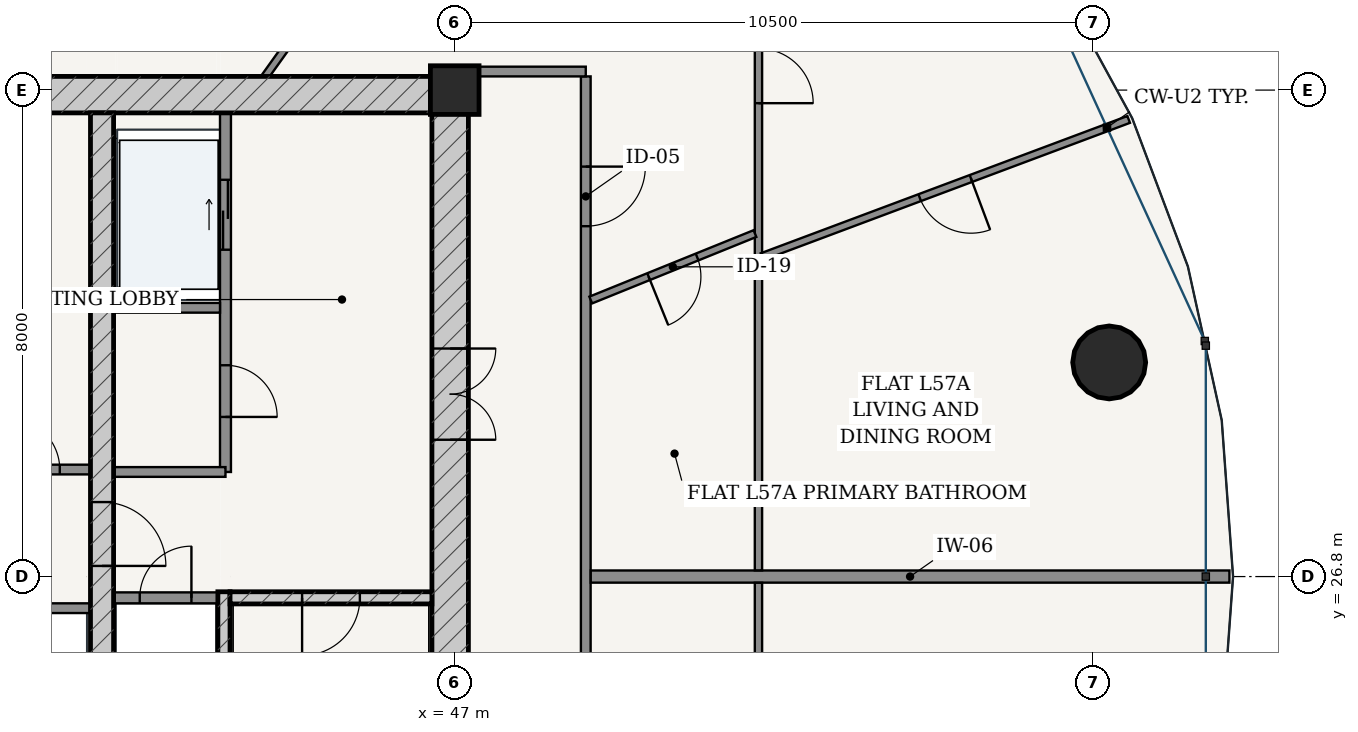
"""IFC4 building model, lengths in metres.
Left out: names, types, materials, properties, quantities, classifications, styles, units other than length and angle.
Written with IfcOpenShell. Run it as: python <this file> out.ifc"""

import sys

from ifc_helpers import new_model, si_unit, direction, frame, frame_2d, origin, origin_2d, place, context, subcontext, project, spatial, rectangle, hollow_circle, extrude, source, transform, mapped, element, fill, save


model = new_model("IFC4")
c1 = context("Model", 3, precision=1e-05, world=origin(), true_north=direction((-0.2419218956, 0.970295726276)))
c2 = subcontext(c1, "Body", "Model", "MODEL_VIEW")
j1 = project(units=[si_unit("LENGTHUNIT", "METRE"), si_unit("PLANEANGLEUNIT", "RADIAN")], contexts=[c1])
p1 = place(None, origin())
s1 = spatial("IfcSite", under=j1, at=p1, CompositionType="ELEMENT")
p2 = place(p1, origin())
s2 = spatial("IfcBuilding", under=s1, at=p2, CompositionType="ELEMENT")
p3 = place(p2, frame((0.0, 0.0, 217.1)))
s3 = spatial("IfcBuildingStorey", under=s2, at=p3, CompositionType="ELEMENT", Elevation=217.1)
p4 = place(p3, frame((47.0, 34.8, 0.0), z_axis=(0.0, 0.0, 1.0), x_axis=(1.0, 0.0, 0.0)))
e1 = element("IfcColumn", 1, at=p4, inside=s3, PredefinedType="COLUMN", context=c2, shape_type="SweptSolid", body=[
    extrude(rectangle(XDim=0.8, YDim=0.8, at=origin_2d()), origin(), (0.0, 0.0, 1.0), 3.7),
])
p5 = place(p3, frame((28.775, 34.725, 0.0), z_axis=(0.0, 0.0, 1.0), x_axis=(1.0, 0.0, 0.0)))
e2 = element("IfcWall", 2, at=p5, inside=s3, PredefinedType="SHEAR", context=c2, shape_type="SweptSolid", body=[
    extrude(rectangle(XDim=18.45, YDim=0.6, at=frame_2d((9.225, 0.0))), origin(), (0.0, 0.0, 1.0), 3.435),
])
p6 = place(p3, frame((46.925, 19.175, 0.0), z_axis=(0.0, 0.0, 1.0), x_axis=(0.0, 1.0, 0.0)))
e3 = element("IfcWall", 3, at=p6, inside=s3, PredefinedType="SHEAR", context=c2, shape_type="SweptSolid", body=[
    extrude(rectangle(XDim=15.25, YDim=0.6, at=frame_2d((7.625, 0.0))), origin(), (0.0, 0.0, 1.0), 3.435),
])
p7 = place(p6, frame((9.875, 0.0, 0.0)))
e4 = element("IfcOpeningElement", 4, at=p7, cuts=e3, PredefinedType="OPENING", context=c2, shape_type="SweptSolid", body=[
    extrude(rectangle(XDim=1.5, YDim=2.2, at=frame_2d((0.75, 1.1))), frame((0.0, 0.31, 0.0), z_axis=(0.0, -1.0, 0.0), x_axis=(1.0, 0.0, 0.0)), (0.0, 0.0, 1.0), 0.62),
])
p8 = place(p3, frame((43.205, 19.175, 0.0), z_axis=(0.0, 0.0, 1.0), x_axis=(0.0, 1.0, 0.0)))
e5 = element("IfcWall", 5, at=p8, inside=s3, PredefinedType="SOLIDWALL", context=c2, shape_type="SweptSolid", body=[
    extrude(rectangle(XDim=7.375, YDim=0.2, at=frame_2d((3.688, 0.0))), origin(), (0.0, 0.0, 1.0), 3.435),
])
p9 = place(p3, frame((43.305, 26.45, 0.0), z_axis=(0.0, 0.0, 1.0), x_axis=(1.0, 0.0, 0.0)))
e6 = element("IfcWall", 6, at=p9, inside=s3, PredefinedType="SOLIDWALL", context=c2, shape_type="SweptSolid", body=[
    extrude(rectangle(XDim=3.32, YDim=0.2, at=frame_2d((1.66, 0.0))), origin(), (0.0, 0.0, 1.0), 3.435),
])
p10 = place(p9, frame((1.185, 0.0, 0.0)))
e7 = element("IfcOpeningElement", 7, at=p10, cuts=e6, PredefinedType="OPENING", context=c2, shape_type="SweptSolid", body=[
    extrude(rectangle(XDim=0.95, YDim=2.15, at=frame_2d((0.475, 1.075))), frame((0.0, 0.11, 0.0), z_axis=(0.0, -1.0, 0.0), x_axis=(1.0, 0.0, 0.0)), (0.0, 0.0, 1.0), 0.22),
])
p11 = place(p3, frame((41.2, 19.175, 0.0), z_axis=(0.0, 0.0, 1.0), x_axis=(0.0, 1.0, 0.0)))
e8 = element("IfcWall", 8, at=p11, inside=s3, PredefinedType="SHEAR", context=c2, shape_type="SweptSolid", body=[
    extrude(rectangle(XDim=15.25, YDim=0.38, at=frame_2d((7.625, 0.0))), origin(), (0.0, 0.0, 1.0), 3.435),
])
p12 = place(p11, frame((7.8, 0.0, 0.0)))
e9 = element("IfcOpeningElement", 9, at=p12, cuts=e8, PredefinedType="OPENING", context=c2, shape_type="SweptSolid", body=[
    extrude(rectangle(XDim=1.05, YDim=2.15, at=frame_2d((0.525, 1.075))), frame((0.0, 0.2, 0.0), z_axis=(0.0, -1.0, 0.0), x_axis=(1.0, 0.0, 0.0)), (0.0, 0.0, 1.0), 0.4),
])
p13 = place(p3, frame((57.763, 30.321, 0.0), z_axis=(0.0, 0.0, 1.0), x_axis=(1.0, 0.0, 0.0)))
e10 = element("IfcColumn", 10, at=p13, inside=s3, PredefinedType="COLUMN", context=c2, shape_type="SweptSolid", body=[
    extrude(hollow_circle(Radius=0.6, WallThickness=0.038, at=origin_2d()), origin(), (0.0, 0.0, 1.0), 3.7),
])
p14 = place(p3, frame((41.39, 26.45, 0.0), z_axis=(0.0, 0.0, 1.0), x_axis=(1.0, 0.0, 0.0)))
e11 = element("IfcWall", 11, at=p14, inside=s3, PredefinedType="PARTITIONING", context=c2, shape_type="SweptSolid", body=[
    extrude(rectangle(XDim=1.71, YDim=0.18, at=frame_2d((0.855, 0.0))), origin(), (0.0, 0.0, 1.0), 3.435),
])
p15 = place(p14, frame((0.43, 0.0, 0.0)))
e12 = element("IfcOpeningElement", 12, at=p15, cuts=e11, PredefinedType="OPENING", context=c2, shape_type="SweptSolid", body=[
    extrude(rectangle(XDim=0.85, YDim=2.1, at=frame_2d((0.425, 1.05))), frame((0.0, 0.1, 0.0), z_axis=(0.0, -1.0, 0.0), x_axis=(1.0, 0.0, 0.0)), (0.0, 0.0, 1.0), 0.2),
])
p16 = place(p3, frame((43.23, 28.52, 0.0), z_axis=(0.0, 0.0, 1.0), x_axis=(0.0, 1.0, 0.0)))
e13 = element("IfcWall", 13, at=p16, inside=s3, PredefinedType="PARTITIONING", context=c2, shape_type="SweptSolid", body=[
    extrude(rectangle(XDim=5.905, YDim=0.18, at=frame_2d((2.953, 0.0))), origin(), (0.0, 0.0, 1.0), 3.435),
])
p17 = place(p16, frame((0.905, 0.0, 0.0)))
e14 = element("IfcOpeningElement", 14, at=p17, cuts=e13, PredefinedType="OPENING", context=c2, shape_type="SweptSolid", body=[
    extrude(rectangle(XDim=0.85, YDim=2.1, at=frame_2d((0.425, 1.05))), frame((0.0, 0.1, 0.0), z_axis=(0.0, -1.0, 0.0), x_axis=(1.0, 0.0, 0.0)), (0.0, 0.0, 1.0), 0.2),
])
p18 = place(p16, frame((3.655, 0.0, 0.0)))
e15 = element("IfcOpeningElement", 15, at=p18, cuts=e13, PredefinedType="OPENING", context=c2, shape_type="SweptSolid", body=[
    extrude(rectangle(XDim=1.15, YDim=2.2, at=frame_2d((0.575, 1.1))), frame((0.0, 0.1, 0.0), z_axis=(0.0, -1.0, 0.0), x_axis=(1.0, 0.0, 0.0)), (0.0, 0.0, 1.0), 0.2),
])
p19 = place(p3, frame((41.39, 31.22, 0.0), z_axis=(0.0, 0.0, 1.0), x_axis=(1.0, 0.0, 0.0)))
e16 = element("IfcWall", 16, at=p19, inside=s3, PredefinedType="PARTITIONING", context=c2, shape_type="SweptSolid", body=[
    extrude(rectangle(XDim=1.75, YDim=0.16, at=frame_2d((0.875, 0.0))), origin(), (0.0, 0.0, 1.0), 3.435),
])
p20 = place(p3, frame((41.39, 28.52, 0.0), z_axis=(0.0, 0.0, 1.0), x_axis=(1.0, 0.0, 0.0)))
e17 = element("IfcWall", 17, at=p20, inside=s3, PredefinedType="PARTITIONING", context=c2, shape_type="SweptSolid", body=[
    extrude(rectangle(XDim=1.84, YDim=0.16, at=frame_2d((0.92, 0.0))), origin(), (0.0, 0.0, 1.0), 3.435),
])
p21 = place(p3, frame((34.99, 28.56, 0.0), z_axis=(0.0, 0.0, 1.0), x_axis=(1.0, 0.0, 0.0)))
e18 = element("IfcWall", 18, at=p21, inside=s3, PredefinedType="PARTITIONING", context=c2, shape_type="SweptSolid", body=[
    extrude(rectangle(XDim=6.02, YDim=0.16, at=frame_2d((3.01, 0.0))), origin(), (0.0, 0.0, 1.0), 3.435),
])
p22 = place(p21, frame((0.505, 0.0, 0.0)))
e19 = element("IfcOpeningElement", 19, at=p22, cuts=e18, PredefinedType="OPENING", context=c2, shape_type="SweptSolid", body=[
    extrude(rectangle(XDim=0.85, YDim=2.1, at=frame_2d((0.425, 1.05))), frame((0.0, 0.09, 0.0), z_axis=(0.0, -1.0, 0.0), x_axis=(1.0, 0.0, 0.0)), (0.0, 0.0, 1.0), 0.18),
])
p23 = place(p21, frame((2.58, 0.0, 0.0)))
e20 = element("IfcOpeningElement", 20, at=p23, cuts=e18, PredefinedType="OPENING", context=c2, shape_type="SweptSolid", body=[
    extrude(rectangle(XDim=0.86, YDim=2.1, at=frame_2d((0.43, 1.05))), frame((0.0, 0.09, 0.0), z_axis=(0.0, -1.0, 0.0), x_axis=(1.0, 0.0, 0.0)), (0.0, 0.0, 1.0), 0.18),
])
p24 = place(p21, frame((4.665, 0.0, 0.0)))
e21 = element("IfcOpeningElement", 21, at=p24, cuts=e18, PredefinedType="OPENING", context=c2, shape_type="SweptSolid", body=[
    extrude(rectangle(XDim=0.85, YDim=2.1, at=frame_2d((0.425, 1.05))), frame((0.0, 0.09, 0.0), z_axis=(0.0, -1.0, 0.0), x_axis=(1.0, 0.0, 0.0)), (0.0, 0.0, 1.0), 0.18),
])
p25 = place(p3, frame((34.99, 26.28, 0.0), z_axis=(0.0, 0.0, 1.0), x_axis=(1.0, 0.0, 0.0)))
e22 = element("IfcWall", 22, at=p25, inside=s3, PredefinedType="PARTITIONING", context=c2, shape_type="SweptSolid", body=[
    extrude(rectangle(XDim=6.02, YDim=0.16, at=frame_2d((3.01, 0.0))), origin(), (0.0, 0.0, 1.0), 3.435),
])
p26 = place(p25, frame((0.225, 0.0, 0.0)))
e23 = element("IfcOpeningElement", 23, at=p26, cuts=e22, PredefinedType="OPENING", context=c2, shape_type="SweptSolid", body=[
    extrude(rectangle(XDim=1.1, YDim=2.2, at=frame_2d((0.55, 1.1))), frame((0.0, 0.09, 0.0), z_axis=(0.0, -1.0, 0.0), x_axis=(1.0, 0.0, 0.0)), (0.0, 0.0, 1.0), 0.18),
])
p27 = place(p25, frame((1.705, 0.0, 0.0)))
e24 = element("IfcOpeningElement", 24, at=p27, cuts=e22, PredefinedType="OPENING", context=c2, shape_type="SweptSolid", body=[
    extrude(rectangle(XDim=1.1, YDim=2.2, at=frame_2d((0.55, 1.1))), frame((0.0, 0.09, 0.0), z_axis=(0.0, -1.0, 0.0), x_axis=(1.0, 0.0, 0.0)), (0.0, 0.0, 1.0), 0.18),
])
p28 = place(p3, frame((49.155, 16.725, 0.0), z_axis=(0.0, 0.0, 1.0), x_axis=(0.0, 1.0, 0.0)))
e25 = element("IfcWall", 25, at=p28, inside=s3, PredefinedType="PARTITIONING", context=c2, shape_type="SweptSolid", body=[
    extrude(rectangle(XDim=18.3, YDim=0.16, at=frame_2d((9.15, 0.0))), origin(), (0.0, 0.0, 1.0), 2.951),
])
p29 = place(p28, frame((15.837, 0.0, 0.0)))
e26 = element("IfcOpeningElement", 26, at=p29, cuts=e25, PredefinedType="OPENING", context=c2, shape_type="SweptSolid", body=[
    extrude(rectangle(XDim=0.98, YDim=2.2, at=frame_2d((0.49, 1.1))), frame((0.0, 0.09, 0.0), z_axis=(0.0, -1.0, 0.0), x_axis=(1.0, 0.0, 0.0)), (0.0, 0.0, 1.0), 0.18),
])
p30 = place(p3, frame((47.225, 35.105, 0.0), z_axis=(0.0, 0.0, 1.0), x_axis=(1.0, 0.0, 0.0)))
e27 = element("IfcWall", 27, at=p30, inside=s3, PredefinedType="PARTITIONING", context=c2, shape_type="SweptSolid", body=[
    extrude(rectangle(XDim=1.93, YDim=0.16, at=frame_2d((0.965, 0.0))), origin(), (0.0, 0.0, 1.0), 3.435),
])
p31 = place(p3, frame((49.237, 26.8, 0.0), z_axis=(0.0, 0.0, 1.0), x_axis=(1.0, 0.0, 0.0)))
e28 = element("IfcWall", 28, at=p31, inside=s3, PredefinedType="PARTITIONING", context=c2, shape_type="SweptSolid", body=[
    extrude(rectangle(XDim=10.503, YDim=0.2, at=frame_2d((5.251, 0.0))), origin(), (0.0, 0.0, 1.0), 2.951),
])
p32 = place(p3, frame((51.995, 37.945, 0.0), z_axis=(0.0, 0.0, 1.0), x_axis=(0.0, -1.0, 0.0)))
e29 = element("IfcWall", 29, at=p32, inside=s3, PredefinedType="PARTITIONING", context=c2, shape_type="SweptSolid", body=[
    extrude(rectangle(XDim=11.043, YDim=0.12, at=frame_2d((5.521, 0.0))), origin(), (0.0, 0.0, 1.0), 2.951),
])
p33 = place(p32, frame((2.46, 0.0, 0.0)))
e30 = element("IfcOpeningElement", 30, at=p33, cuts=e29, PredefinedType="OPENING", context=c2, shape_type="SweptSolid", body=[
    extrude(rectangle(XDim=0.9, YDim=2.15, at=frame_2d((0.45, 1.075))), frame((0.0, 0.07, 0.0), z_axis=(0.0, -1.0, 0.0), x_axis=(1.0, 0.0, 0.0)), (0.0, 0.0, 1.0), 0.14),
])
p34 = place(p3, frame((52.053, 32.06, 0.0), z_axis=(0.0, 0.0, 1.0), x_axis=(0.936547148815, 0.350541635255, 0.0)))
e31 = element("IfcWall", 31, at=p34, inside=s3, PredefinedType="PARTITIONING", context=c2, shape_type="SweptSolid", body=[
    extrude(rectangle(XDim=6.439, YDim=0.12, at=frame_2d((3.219, 0.0))), origin(), (0.0, 0.0, 1.0), 2.951),
])
p35 = place(p34, frame((2.769, 0.0, 0.0)))
e32 = element("IfcOpeningElement", 32, at=p35, cuts=e31, PredefinedType="OPENING", context=c2, shape_type="SweptSolid", body=[
    extrude(rectangle(XDim=0.9, YDim=2.15, at=frame_2d((0.45, 1.075))), frame((0.0, 0.07, 0.0), z_axis=(0.0, -1.0, 0.0), x_axis=(1.0, 0.0, 0.0)), (0.0, 0.0, 1.0), 0.14),
])
p36 = place(p3, frame((49.237, 31.347, 0.0), z_axis=(0.0, 0.0, 1.0), x_axis=(0.926960690293, 0.375158471383, 0.0)))
e33 = element("IfcWall", 33, at=p36, inside=s3, PredefinedType="PARTITIONING", context=c2, shape_type="SweptSolid", body=[
    extrude(rectangle(XDim=2.914, YDim=0.12, at=frame_2d((1.457, 0.0))), origin(), (0.0, 0.0, 1.0), 3.11),
])
p37 = place(p36, frame((1.027, 0.0, 0.0)))
e34 = element("IfcOpeningElement", 34, at=p37, cuts=e33, PredefinedType="OPENING", context=c2, shape_type="SweptSolid", body=[
    extrude(rectangle(XDim=0.86, YDim=2.15, at=frame_2d((0.43, 1.075))), frame((0.0, 0.07, 0.0), z_axis=(0.0, -1.0, 0.0), x_axis=(1.0, 0.0, 0.0)), (0.0, 0.0, 1.0), 0.14),
])
p38 = place(p3, frame((43.885, 35.027, 0.0), z_axis=(0.0, 0.0, 1.0), x_axis=(0.581801309538, 0.813330951225, 0.0)))
e35 = element("IfcWall", 35, at=p38, inside=s3, PredefinedType="PARTITIONING", context=c2, shape_type="SweptSolid", body=[
    extrude(rectangle(XDim=3.526, YDim=0.12, at=frame_2d((1.763, 0.0))), origin(), (0.0, 0.0, 1.0), 3.435),
])
p39 = place(p38, frame((1.313, 0.0, 0.0)))
e36 = element("IfcOpeningElement", 36, at=p39, cuts=e35, PredefinedType="OPENING", context=c2, shape_type="SweptSolid", body=[
    extrude(rectangle(XDim=0.9, YDim=2.15, at=frame_2d((0.45, 1.075))), frame((0.0, 0.07, 0.0), z_axis=(0.0, -1.0, 0.0), x_axis=(1.0, 0.0, 0.0)), (0.0, 0.0, 1.0), 0.14),
])
p40 = place(p3, frame((39.811, 35.027, 0.0), z_axis=(0.0, 0.0, 1.0), x_axis=(0.214966857327, 0.976621344356, 0.0)))
e37 = element("IfcWall", 37, at=p40, inside=s3, PredefinedType="PARTITIONING", context=c2, shape_type="SweptSolid", body=[
    extrude(rectangle(XDim=11.258, YDim=0.2, at=frame_2d((5.629, 0.0))), origin(), (0.0, 0.0, 1.0), 2.52),
])
p41 = place(p3, frame((51.995, 26.698, 0.0), z_axis=(0.0, 0.0, 1.0), x_axis=(0.0, -1.0, 0.0)))
e38 = element("IfcWall", 38, at=p41, inside=s3, PredefinedType="PARTITIONING", context=c2, shape_type="SweptSolid", body=[
    extrude(rectangle(XDim=12.893, YDim=0.12, at=frame_2d((6.447, 0.0))), origin(), (0.0, 0.0, 1.0), 2.951),
])
p42 = place(p41, frame((10.051, 0.0, 0.0)))
e39 = element("IfcOpeningElement", 39, at=p42, cuts=e38, PredefinedType="OPENING", context=c2, shape_type="SweptSolid", body=[
    extrude(rectangle(XDim=0.9, YDim=2.15, at=frame_2d((0.45, 1.075))), frame((0.0, 0.07, 0.0), z_axis=(0.0, -1.0, 0.0), x_axis=(1.0, 0.0, 0.0)), (0.0, 0.0, 1.0), 0.14),
])
p43 = place(p41, frame((5.873, 0.0, 0.0)))
e40 = element("IfcOpeningElement", 40, at=p43, cuts=e38, PredefinedType="OPENING", context=c2, shape_type="SweptSolid", body=[
    extrude(rectangle(XDim=0.9, YDim=2.15, at=frame_2d((0.45, 1.075))), frame((0.0, 0.07, 0.0), z_axis=(0.0, -1.0, 0.0), x_axis=(1.0, 0.0, 0.0)), (0.0, 0.0, 1.0), 0.14),
])
m1 = source(origin(), c2, "Body", "SweptSolid", [
    extrude(rectangle(XDim=1.5, YDim=2.2, at=frame_2d((0.75, 1.1))), frame((0.0, 0.025, 0.0), z_axis=(0.0, -1.0, 0.0), x_axis=(1.0, 0.0, 0.0)), (0.0, 0.0, 1.0), 0.05),
])
p44 = place(p7, frame((1.5, 0.0, 0.0), z_axis=(0.0, 0.0, 1.0), x_axis=(-1.0, 0.0, 0.0)))
e41 = element("IfcDoor", 41, at=p44, inside=s3, OperationType="DOUBLE_DOOR_SINGLE_SWING", PredefinedType="DOOR", context=c2, shape_type="MappedRepresentation", body=[
    mapped(m1, transform((0.0, 0.0, 0.0), scale=1.0)),
])
fill(e4, e41)
m2 = source(origin(), c2, "Body", "SweptSolid", [
    extrude(rectangle(XDim=1.05, YDim=2.15, at=frame_2d((0.525, 1.075))), frame((0.0, 0.025, 0.0), z_axis=(0.0, -1.0, 0.0), x_axis=(1.0, 0.0, 0.0)), (0.0, 0.0, 1.0), 0.05),
])
p45 = place(p12, frame((1.05, 0.0, 0.0), z_axis=(0.0, 0.0, 1.0), x_axis=(-1.0, 0.0, 0.0)))
e42 = element("IfcDoor", 42, at=p45, inside=s3, OperationType="SINGLE_SWING_RIGHT", PredefinedType="DOOR", context=c2, shape_type="MappedRepresentation", body=[
    mapped(m2, transform((0.0, 0.0, 0.0), scale=1.0)),
])
fill(e9, e42)
m3 = source(origin(), c2, "Body", "SweptSolid", [
    extrude(rectangle(XDim=0.95, YDim=2.15, at=frame_2d((0.475, 1.075))), frame((0.0, 0.025, 0.0), z_axis=(0.0, -1.0, 0.0), x_axis=(1.0, 0.0, 0.0)), (0.0, 0.0, 1.0), 0.05),
])
p46 = place(p10, frame((0.95, 0.0, 0.0), z_axis=(0.0, 0.0, 1.0), x_axis=(-1.0, 0.0, 0.0)))
e43 = element("IfcDoor", 43, at=p46, inside=s3, OperationType="SINGLE_SWING_RIGHT", PredefinedType="DOOR", context=c2, shape_type="MappedRepresentation", body=[
    mapped(m3, transform((0.0, 0.0, 0.0), scale=1.0)),
])
fill(e7, e43)
m4 = source(origin(), c2, "Body", "SweptSolid", [
    extrude(rectangle(XDim=0.85, YDim=2.1, at=frame_2d((0.425, 1.05))), frame((0.0, 0.025, 0.0), z_axis=(0.0, -1.0, 0.0), x_axis=(1.0, 0.0, 0.0)), (0.0, 0.0, 1.0), 0.05),
])
p47 = place(p15, origin())
e44 = element("IfcDoor", 44, at=p47, inside=s3, OperationType="SINGLE_SWING_RIGHT", PredefinedType="DOOR", context=c2, shape_type="MappedRepresentation", body=[
    mapped(m4, transform((0.0, 0.0, 0.0), scale=1.0)),
])
fill(e12, e44)
p48 = place(p17, frame((0.85, 0.0, 0.0), z_axis=(0.0, 0.0, 1.0), x_axis=(-1.0, 0.0, 0.0)))
e45 = element("IfcDoor", 45, at=p48, inside=s3, OperationType="SINGLE_SWING_RIGHT", PredefinedType="DOOR", context=c2, shape_type="MappedRepresentation", body=[
    mapped(m4, transform((0.0, 0.0, 0.0), scale=1.0)),
])
fill(e14, e45)
p49 = place(p24, origin())
e46 = element("IfcDoor", 46, at=p49, inside=s3, OperationType="SINGLE_SWING_LEFT", PredefinedType="DOOR", context=c2, shape_type="MappedRepresentation", body=[
    mapped(m4, transform((0.0, 0.0, 0.0), scale=1.0)),
])
fill(e21, e46)
m5 = source(origin(), c2, "Body", "SweptSolid", [
    extrude(rectangle(XDim=1.15, YDim=2.2, at=frame_2d((0.575, 1.1))), frame((0.0, 0.025, 0.0), z_axis=(0.0, -1.0, 0.0), x_axis=(1.0, 0.0, 0.0)), (0.0, 0.0, 1.0), 0.05),
])
p50 = place(p18, origin())
e47 = element("IfcDoor", 47, at=p50, inside=s3, OperationType="DOUBLE_DOOR_SLIDING", PredefinedType="DOOR", context=c2, shape_type="MappedRepresentation", body=[
    mapped(m5, transform((0.0, 0.0, 0.0), scale=1.0)),
])
fill(e15, e47)
m6 = source(origin(), c2, "Body", "SweptSolid", [
    extrude(rectangle(XDim=0.98, YDim=2.2, at=frame_2d((0.49, 1.1))), frame((0.0, 0.025, 0.0), z_axis=(0.0, -1.0, 0.0), x_axis=(1.0, 0.0, 0.0)), (0.0, 0.0, 1.0), 0.05),
])
p51 = place(p29, frame((0.98, 0.0, 0.0), z_axis=(0.0, 0.0, 1.0), x_axis=(-1.0, 0.0, 0.0)))
e48 = element("IfcDoor", 48, at=p51, inside=s3, OperationType="SINGLE_SWING_LEFT", PredefinedType="DOOR", context=c2, shape_type="MappedRepresentation", body=[
    mapped(m6, transform((0.0, 0.0, 0.0), scale=1.0)),
])
fill(e26, e48)
m7 = source(origin(), c2, "Body", "SweptSolid", [
    extrude(rectangle(XDim=0.86, YDim=2.15, at=frame_2d((0.43, 1.075))), frame((0.0, 0.025, 0.0), z_axis=(0.0, -1.0, 0.0), x_axis=(1.0, 0.0, 0.0)), (0.0, 0.0, 1.0), 0.05),
])
p52 = place(p37, frame((0.86, 0.0, 0.0), z_axis=(0.0, 0.0, 1.0), x_axis=(-1.0, 0.0, 0.0)))
e49 = element("IfcDoor", 49, at=p52, inside=s3, OperationType="SINGLE_SWING_RIGHT", PredefinedType="DOOR", context=c2, shape_type="MappedRepresentation", body=[
    mapped(m7, transform((0.0, 0.0, 0.0), scale=1.0)),
])
fill(e34, e49)
m8 = source(origin(), c2, "Body", "SweptSolid", [
    extrude(rectangle(XDim=0.9, YDim=2.15, at=frame_2d((0.45, 1.075))), frame((0.0, 0.025, 0.0), z_axis=(0.0, -1.0, 0.0), x_axis=(1.0, 0.0, 0.0)), (0.0, 0.0, 1.0), 0.05),
])
p53 = place(p33, origin())
e50 = element("IfcDoor", 50, at=p53, inside=s3, OperationType="SINGLE_SWING_RIGHT", PredefinedType="DOOR", context=c2, shape_type="MappedRepresentation", body=[
    mapped(m8, transform((0.0, 0.0, 0.0), scale=1.0)),
])
fill(e30, e50)
p54 = place(p35, frame((0.9, 0.0, 0.0), z_axis=(0.0, 0.0, 1.0), x_axis=(-1.0, 0.0, 0.0)))
e51 = element("IfcDoor", 51, at=p54, inside=s3, OperationType="SINGLE_SWING_LEFT", PredefinedType="DOOR", context=c2, shape_type="MappedRepresentation", body=[
    mapped(m8, transform((0.0, 0.0, 0.0), scale=1.0)),
])
fill(e32, e51)
save(model, sys.argv[1])
